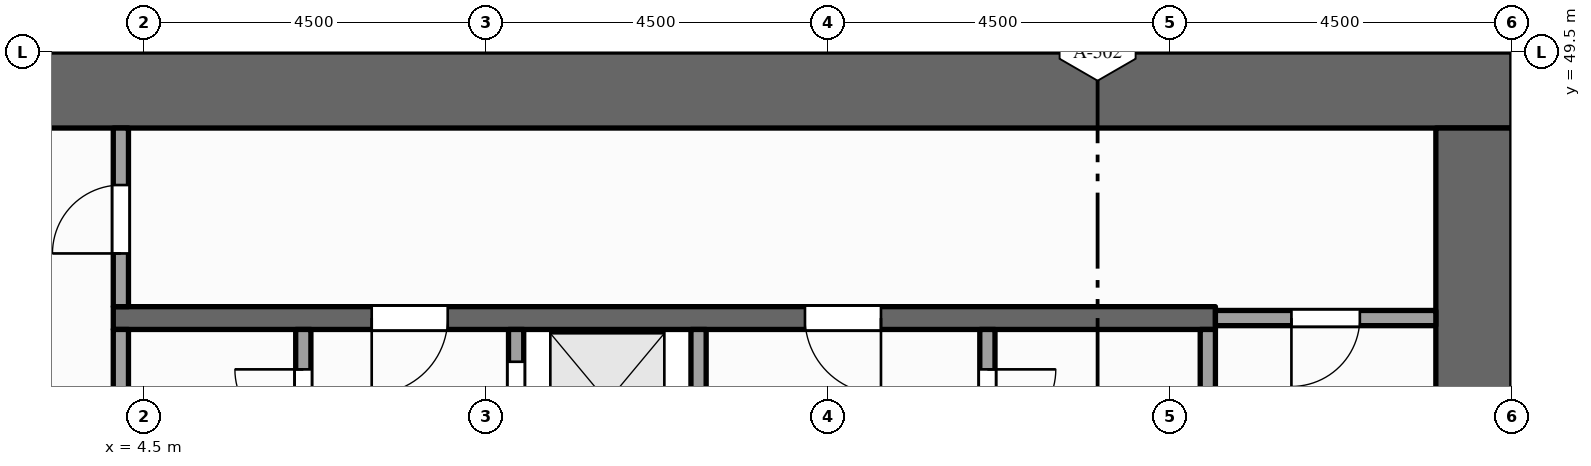
"""IFC4 building model, lengths in metres.
Left out: names, types, materials, properties, quantities, classifications, styles, units other than length and angle.
Written with IfcOpenShell. Run it as: python <this file> out.ifc"""

import sys

from ifc_helpers import new_model, si_unit, direction, frame, frame_2d, origin, place, context, subcontext, project, spatial, rectangle, extrude, element, fill, save


model = new_model("IFC4")
c1 = context("Model", 3, precision=1e-05, world=origin(), true_north=direction((0.0, 1.0)))
c2 = subcontext(c1, "Body", "Model", "MODEL_VIEW")
j1 = project(units=[si_unit("LENGTHUNIT", "METRE"), si_unit("PLANEANGLEUNIT", "RADIAN")], contexts=[c1])
p1 = place(None, origin())
s1 = spatial("IfcSite", under=j1, at=p1, CompositionType="ELEMENT")
p2 = place(p1, origin())
s2 = spatial("IfcBuilding", under=s1, at=p2, CompositionType="ELEMENT")
p3 = place(p2, frame((0.0, 0.0, 187.0)))
s3 = spatial("IfcBuildingStorey", under=s2, at=p3, CompositionType="ELEMENT", Elevation=187.0)
p4 = place(p3, frame((0.0, 49.0, -0.15), z_axis=(0.0, 0.0, 1.0), x_axis=(1.0, 0.0, 0.0)))
e1 = element("IfcWall", 1, at=p4, inside=s3, PredefinedType="SHEAR", context=c2, shape_type="SweptSolid", body=[
    extrude(rectangle(XDim=22.5, YDim=1.0, at=frame_2d((11.25, 0.0))), origin(), (0.0, 0.0, 1.0), 8.0),
])
p5 = place(p3, frame((22.0, 37.0, -0.15), z_axis=(0.0, 0.0, 1.0), x_axis=(0.0, 1.0, 0.0)))
e2 = element("IfcWall", 2, at=p5, inside=s3, PredefinedType="SHEAR", context=c2, shape_type="SweptSolid", body=[
    extrude(rectangle(XDim=11.5, YDim=1.0, at=frame_2d((5.75, 0.0))), origin(), (0.0, 0.0, 1.0), 8.0),
])
p6 = place(p3, frame((4.2, 43.525, 0.0), z_axis=(0.0, 0.0, 1.0), x_axis=(0.0, 1.0, 0.0)))
e3 = element("IfcWall", 3, at=p6, inside=s3, PredefinedType="PARTITIONING", context=c2, shape_type="SweptSolid", body=[
    extrude(rectangle(XDim=2.325, YDim=0.2, at=frame_2d((1.163, 0.0))), origin(), (0.0, 0.0, 1.0), 7.85),
])
p7 = place(p3, frame((4.2, 46.15, 0.0), z_axis=(0.0, 0.0, 1.0), x_axis=(0.0, 1.0, 0.0)))
e4 = element("IfcWall", 4, at=p7, inside=s3, PredefinedType="PARTITIONING", context=c2, shape_type="SweptSolid", body=[
    extrude(rectangle(XDim=2.35, YDim=0.2, at=frame_2d((1.175, 0.0))), origin(), (0.0, 0.0, 1.0), 7.85),
])
p8 = place(p7, frame((0.7, 0.0, 0.0)))
e5 = element("IfcOpeningElement", 5, at=p8, cuts=e4, PredefinedType="OPENING", context=c2, shape_type="SweptSolid", body=[
    extrude(rectangle(XDim=0.9, YDim=2.1, at=frame_2d((0.45, 1.05))), frame((0.0, 0.11, 0.0), z_axis=(0.0, -1.0, 0.0), x_axis=(1.0, 0.0, 0.0)), (0.0, 0.0, 1.0), 0.22),
])
p9 = place(p3, frame((6.6, 37.0, 0.0), z_axis=(0.0, 0.0, 1.0), x_axis=(0.0, 1.0, 0.0)))
e6 = element("IfcWall", 6, at=p9, inside=s3, PredefinedType="PARTITIONING", context=c2, shape_type="SweptSolid", body=[
    extrude(rectangle(XDim=8.85, YDim=0.2, at=frame_2d((4.425, 0.0))), origin(), (0.0, 0.0, 1.0), 7.85),
])
p10 = place(p9, frame((2.9, 0.0, 0.0)))
e7 = element("IfcOpeningElement", 7, at=p10, cuts=e6, PredefinedType="OPENING", context=c2, shape_type="SweptSolid", body=[
    extrude(rectangle(XDim=0.9, YDim=2.1, at=frame_2d((0.45, 1.05))), frame((0.0, 0.11, 0.0), z_axis=(0.0, -1.0, 0.0), x_axis=(1.0, 0.0, 0.0)), (0.0, 0.0, 1.0), 0.22),
])
p11 = place(p9, frame((7.425, 0.0, 0.0)))
e8 = element("IfcOpeningElement", 8, at=p11, cuts=e6, PredefinedType="OPENING", context=c2, shape_type="SweptSolid", body=[
    extrude(rectangle(XDim=0.9, YDim=2.1, at=frame_2d((0.45, 1.05))), frame((0.0, 0.11, 0.0), z_axis=(0.0, -1.0, 0.0), x_axis=(1.0, 0.0, 0.0)), (0.0, 0.0, 1.0), 0.22),
])
p12 = place(p3, frame((9.4, 37.0, 0.0), z_axis=(0.0, 0.0, 1.0), x_axis=(0.0, 1.0, 0.0)))
e9 = element("IfcWall", 9, at=p12, inside=s3, PredefinedType="SOLIDWALL", context=c2, shape_type="SweptSolid", body=[
    extrude(rectangle(XDim=8.85, YDim=0.2, at=frame_2d((4.425, 0.0))), origin(), (0.0, 0.0, 1.0), 7.85),
])
p13 = place(p12, frame((0.6, 0.0, 0.012)))
e10 = element("IfcOpeningElement", 10, at=p13, cuts=e9, PredefinedType="OPENING", context=c2, shape_type="SweptSolid", body=[
    extrude(rectangle(XDim=1.1, YDim=2.1, at=frame_2d((0.55, 1.05))), frame((0.0, 0.11, 0.0), z_axis=(0.0, -1.0, 0.0), x_axis=(1.0, 0.0, 0.0)), (0.0, 0.0, 1.0), 0.22),
])
p14 = place(p12, frame((2.95, 0.0, 0.012)))
e11 = element("IfcOpeningElement", 11, at=p14, cuts=e9, PredefinedType="OPENING", context=c2, shape_type="SweptSolid", body=[
    extrude(rectangle(XDim=1.1, YDim=2.1, at=frame_2d((0.55, 1.05))), frame((0.0, 0.11, 0.0), z_axis=(0.0, -1.0, 0.0), x_axis=(1.0, 0.0, 0.0)), (0.0, 0.0, 1.0), 0.22),
])
p15 = place(p12, frame((5.15, 0.0, 0.012)))
e12 = element("IfcOpeningElement", 12, at=p15, cuts=e9, PredefinedType="OPENING", context=c2, shape_type="SweptSolid", body=[
    extrude(rectangle(XDim=1.1, YDim=2.1, at=frame_2d((0.55, 1.05))), frame((0.0, 0.11, 0.0), z_axis=(0.0, -1.0, 0.0), x_axis=(1.0, 0.0, 0.0)), (0.0, 0.0, 1.0), 0.22),
])
p16 = place(p12, frame((7.325, 0.0, 0.012)))
e13 = element("IfcOpeningElement", 13, at=p16, cuts=e9, PredefinedType="OPENING", context=c2, shape_type="SweptSolid", body=[
    extrude(rectangle(XDim=1.1, YDim=2.1, at=frame_2d((0.55, 1.05))), frame((0.0, 0.11, 0.0), z_axis=(0.0, -1.0, 0.0), x_axis=(1.0, 0.0, 0.0)), (0.0, 0.0, 1.0), 0.22),
])
p17 = place(p3, frame((11.8, 37.0, 0.0), z_axis=(0.0, 0.0, 1.0), x_axis=(0.0, 1.0, 0.0)))
e14 = element("IfcWall", 14, at=p17, inside=s3, PredefinedType="SOLIDWALL", context=c2, shape_type="SweptSolid", body=[
    extrude(rectangle(XDim=8.85, YDim=0.2, at=frame_2d((4.425, 0.0))), origin(), (0.0, 0.0, 1.0), 7.85),
])
p18 = place(p3, frame((15.6, 43.9, 0.0), z_axis=(0.0, 0.0, 1.0), x_axis=(0.0, 1.0, 0.0)))
e15 = element("IfcWall", 15, at=p18, inside=s3, PredefinedType="PARTITIONING", context=c2, shape_type="SweptSolid", body=[
    extrude(rectangle(XDim=1.95, YDim=0.2, at=frame_2d((0.975, 0.0))), origin(), (0.0, 0.0, 1.0), 7.85),
])
p19 = place(p18, frame((0.525, 0.0, 0.0)))
e16 = element("IfcOpeningElement", 16, at=p19, cuts=e15, PredefinedType="OPENING", context=c2, shape_type="SweptSolid", body=[
    extrude(rectangle(XDim=0.9, YDim=2.1, at=frame_2d((0.45, 1.05))), frame((0.0, 0.11, 0.0), z_axis=(0.0, -1.0, 0.0), x_axis=(1.0, 0.0, 0.0)), (0.0, 0.0, 1.0), 0.22),
])
p20 = place(p3, frame((18.5, 43.9, 0.0), z_axis=(0.0, 0.0, 1.0), x_axis=(0.0, 1.0, 0.0)))
e17 = element("IfcWall", 17, at=p20, inside=s3, PredefinedType="PARTITIONING", context=c2, shape_type="SweptSolid", body=[
    extrude(rectangle(XDim=1.95, YDim=0.2, at=frame_2d((0.975, 0.0))), origin(), (0.0, 0.0, 1.0), 7.85),
])
p21 = place(p3, frame((4.1, 46.0, 0.0), z_axis=(0.0, 0.0, 1.0), x_axis=(1.0, 0.0, 0.0)))
e18 = element("IfcWall", 18, at=p21, inside=s3, PredefinedType="SHEAR", context=c2, shape_type="SweptSolid", body=[
    extrude(rectangle(XDim=14.5, YDim=0.3, at=frame_2d((7.25, 0.0))), origin(), (0.0, 0.0, 1.0), 7.85),
])
p22 = place(p21, frame((3.4, 0.0, 0.0)))
e19 = element("IfcOpeningElement", 19, at=p22, cuts=e18, PredefinedType="OPENING", context=c2, shape_type="SweptSolid", body=[
    extrude(rectangle(XDim=1.0, YDim=2.1, at=frame_2d((0.5, 1.05))), frame((0.0, 0.16, 0.0), z_axis=(0.0, -1.0, 0.0), x_axis=(1.0, 0.0, 0.0)), (0.0, 0.0, 1.0), 0.32),
])
p23 = place(p21, frame((9.1, 0.0, 0.0)))
e20 = element("IfcOpeningElement", 20, at=p23, cuts=e18, PredefinedType="OPENING", context=c2, shape_type="SweptSolid", body=[
    extrude(rectangle(XDim=1.0, YDim=2.1, at=frame_2d((0.5, 1.05))), frame((0.0, 0.16, 0.0), z_axis=(0.0, -1.0, 0.0), x_axis=(1.0, 0.0, 0.0)), (0.0, 0.0, 1.0), 0.32),
])
p24 = place(p3, frame((18.6, 46.0, 0.0), z_axis=(0.0, 0.0, 1.0), x_axis=(1.0, 0.0, 0.0)))
e21 = element("IfcWall", 21, at=p24, inside=s3, PredefinedType="PARTITIONING", context=c2, shape_type="SweptSolid", body=[
    extrude(rectangle(XDim=2.9, YDim=0.2, at=frame_2d((1.45, 0.0))), origin(), (0.0, 0.0, 1.0), 7.85),
])
p25 = place(p24, frame((1.0, 0.0, 0.0)))
e22 = element("IfcOpeningElement", 22, at=p25, cuts=e21, PredefinedType="OPENING", context=c2, shape_type="SweptSolid", body=[
    extrude(rectangle(XDim=0.9, YDim=2.1, at=frame_2d((0.45, 1.05))), frame((0.0, 0.11, 0.0), z_axis=(0.0, -1.0, 0.0), x_axis=(1.0, 0.0, 0.0)), (0.0, 0.0, 1.0), 0.22),
])
p26 = place(p16, origin())
e23 = element("IfcDoor", 23, at=p26, inside=s3, OperationType="SLIDING_TO_LEFT", PredefinedType="DOOR", context=c2, shape_type="SweptSolid", body=[
    extrude(rectangle(XDim=1.1, YDim=2.1, at=frame_2d((0.55, 1.05))), frame((0.0, 0.025, 0.0), z_axis=(0.0, -1.0, 0.0), x_axis=(1.0, 0.0, 0.0)), (0.0, 0.0, 1.0), 0.05),
])
fill(e13, e23)
p27 = place(p22, origin())
e24 = element("IfcDoor", 24, at=p27, inside=s3, OperationType="SINGLE_SWING_LEFT", PredefinedType="DOOR", context=c2, shape_type="SweptSolid", body=[
    extrude(rectangle(XDim=1.0, YDim=2.1, at=frame_2d((0.5, 1.05))), frame((0.0, 0.025, 0.0), z_axis=(0.0, -1.0, 0.0), x_axis=(1.0, 0.0, 0.0)), (0.0, 0.0, 1.0), 0.05),
])
fill(e19, e24)
p28 = place(p23, origin())
e25 = element("IfcDoor", 25, at=p28, inside=s3, OperationType="SINGLE_SWING_RIGHT", PredefinedType="DOOR", context=c2, shape_type="SweptSolid", body=[
    extrude(rectangle(XDim=1.0, YDim=2.1, at=frame_2d((0.5, 1.05))), frame((0.0, 0.025, 0.0), z_axis=(0.0, -1.0, 0.0), x_axis=(1.0, 0.0, 0.0)), (0.0, 0.0, 1.0), 0.05),
])
fill(e20, e25)
p29 = place(p8, origin())
e26 = element("IfcDoor", 26, at=p29, inside=s3, OperationType="SINGLE_SWING_LEFT", PredefinedType="DOOR", context=c2, shape_type="SweptSolid", body=[
    extrude(rectangle(XDim=0.9, YDim=2.1, at=frame_2d((0.45, 1.05))), frame((0.0, 0.025, 0.0), z_axis=(0.0, -1.0, 0.0), x_axis=(1.0, 0.0, 0.0)), (0.0, 0.0, 1.0), 0.05),
])
fill(e5, e26)
p30 = place(p25, origin())
e27 = element("IfcDoor", 27, at=p30, inside=s3, OperationType="SINGLE_SWING_LEFT", PredefinedType="DOOR", context=c2, shape_type="SweptSolid", body=[
    extrude(rectangle(XDim=0.9, YDim=2.1, at=frame_2d((0.45, 1.05))), frame((0.0, 0.025, 0.0), z_axis=(0.0, -1.0, 0.0), x_axis=(1.0, 0.0, 0.0)), (0.0, 0.0, 1.0), 0.05),
])
fill(e22, e27)
p31 = place(p11, origin())
e28 = element("IfcDoor", 28, at=p31, inside=s3, OperationType="SINGLE_SWING_RIGHT", PredefinedType="DOOR", context=c2, shape_type="SweptSolid", body=[
    extrude(rectangle(XDim=0.9, YDim=2.1, at=frame_2d((0.45, 1.05))), frame((0.0, 0.025, 0.0), z_axis=(0.0, -1.0, 0.0), x_axis=(1.0, 0.0, 0.0)), (0.0, 0.0, 1.0), 0.05),
])
fill(e8, e28)
p32 = place(p19, origin())
e29 = element("IfcDoor", 29, at=p32, inside=s3, OperationType="SINGLE_SWING_RIGHT", PredefinedType="DOOR", context=c2, shape_type="SweptSolid", body=[
    extrude(rectangle(XDim=0.9, YDim=2.1, at=frame_2d((0.45, 1.05))), frame((0.0, 0.025, 0.0), z_axis=(0.0, -1.0, 0.0), x_axis=(1.0, 0.0, 0.0)), (0.0, 0.0, 1.0), 0.05),
])
fill(e16, e29)
save(model, sys.argv[1])
